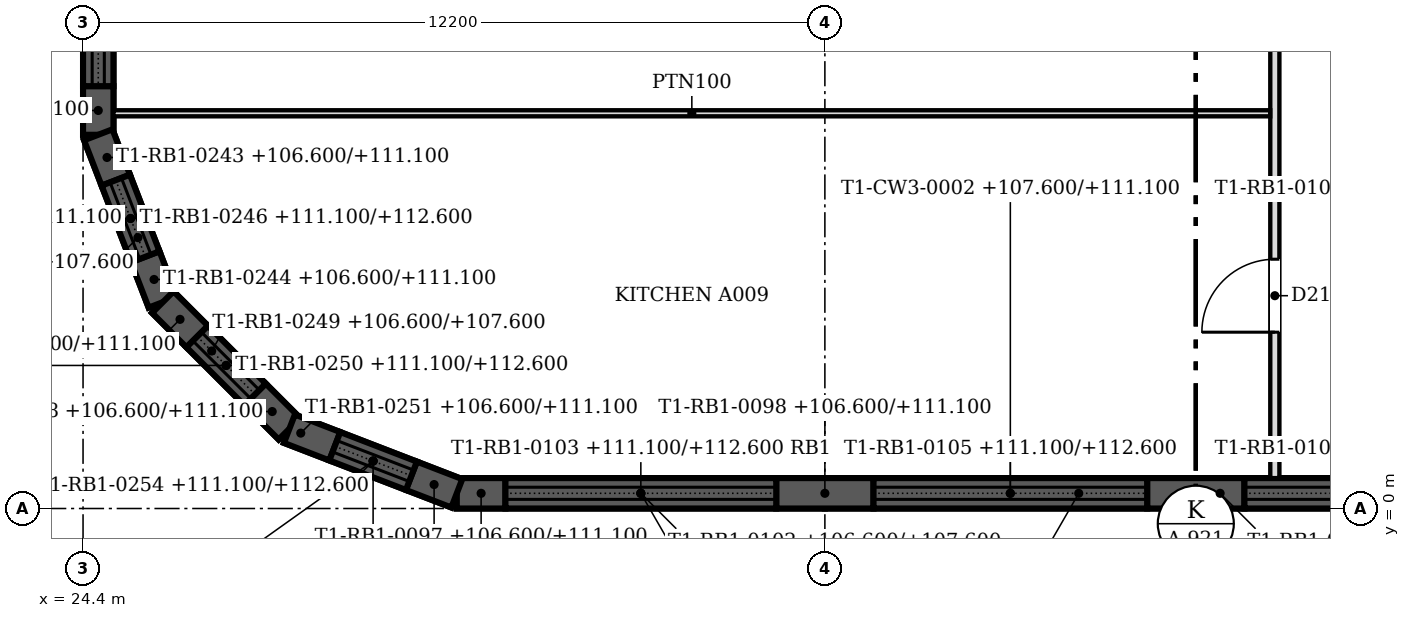
"""IFC4 building model, lengths in metres.
Left out: names, types, materials, properties, quantities, classifications, styles, units other than length and angle.
Written with IfcOpenShell. Run it as: python <this file> out.ifc"""

import sys

from ifc_helpers import new_model, si_unit, direction, frame, frame_2d, origin, place, context, subcontext, project, spatial, polyline, rectangle, outline, extrude, faceted_brep, source, transform, mapped, element, fill, save


model = new_model("IFC4")
c1 = context("Model", 3, precision=1e-05, world=origin(), true_north=direction((0.0, 1.0)))
c2 = subcontext(c1, "Body", "Model", "MODEL_VIEW")
j1 = project(units=[si_unit("LENGTHUNIT", "METRE"), si_unit("PLANEANGLEUNIT", "RADIAN")], contexts=[c1])
p1 = place(None, origin())
s1 = spatial("IfcSite", under=j1, at=p1, CompositionType="ELEMENT")
p2 = place(p1, origin())
s2 = spatial("IfcBuilding", under=s1, at=p2, CompositionType="ELEMENT")
p3 = place(p2, frame((0.0, 0.0, 106.6)))
s3 = spatial("IfcBuildingStorey", under=s2, at=p3, CompositionType="ELEMENT", Elevation=106.6)
m1 = source(origin(), c2, "Body", "Brep", [
    faceted_brep([(0.0, -0.25, 0.0), (0.8, -0.25, 0.0), (0.8, -0.25, 4.5), (0.0, -0.25, 4.5), (0.047, 0.25, 4.5), (0.8, 0.25, 4.5), (0.8, 0.25, 0.0), (0.047, 0.25, 0.0), (0.0, 0.0, 0.0), (0.0, 0.0, 4.5)], [[[0, 1, 2, 3]], [[4, 5, 6, 7]], [[7, 6, 1, 0, 8]], [[5, 4, 9, 3, 2]], [[8, 0, 3, 9]], [[7, 8, 9, 4]], [[1, 6, 5, 2]]]),
])
p4 = place(p3, frame((30.547, 0.25, 0.0), z_axis=(0.0, 0.0, 1.0), x_axis=(1.0, 0.0, 0.0)))
e1 = element("IfcWall", 1, at=p4, inside=s3, PredefinedType="SOLIDWALL", context=c2, shape_type="MappedRepresentation", body=[
    mapped(m1, transform((0.0, 0.0, 0.0), scale=1.0)),
])
m2 = source(origin(), c2, "Body", "Brep", [
    faceted_brep([(0.0, -0.25, 0.0), (1.6, -0.25, 0.0), (1.6, -0.25, 4.5), (0.0, -0.25, 4.5), (0.0, 0.25, 4.5), (1.6, 0.25, 4.5), (1.6, 0.25, 0.0), (0.0, 0.25, 0.0)], [[[0, 1, 2, 3]], [[4, 5, 6, 7]], [[7, 6, 1, 0]], [[5, 4, 3, 2]], [[4, 7, 0, 3]], [[1, 6, 5, 2]]]),
])
p5 = place(p3, frame((35.8, 0.25, 0.0), z_axis=(0.0, 0.0, 1.0), x_axis=(1.0, 0.0, 0.0)))
e2 = element("IfcWall", 2, at=p5, inside=s3, PredefinedType="SOLIDWALL", context=c2, shape_type="MappedRepresentation", body=[
    mapped(m2, transform((0.0, 0.0, 0.0), scale=1.0)),
])
m3 = source(origin(), c2, "Body", "SweptSolid", [
    extrude(outline(polyline([(0.0, 0.0), (1.6, 0.0), (1.6, 4.5), (0.0, 4.5), (0.0, 0.0)])), frame((0.0, 0.25, 0.0), z_axis=(0.0, -1.0, 0.0), x_axis=(1.0, 0.0, 0.0)), (0.0, 0.0, 1.0), 0.5),
])
p6 = place(p3, frame((41.9, 0.25, 0.0), z_axis=(0.0, 0.0, 1.0), x_axis=(1.0, 0.0, 0.0)))
e3 = element("IfcWall", 3, at=p6, inside=s3, PredefinedType="SOLIDWALL", context=c2, shape_type="MappedRepresentation", body=[
    mapped(m3, transform((0.0, 0.0, 0.0), scale=1.0)),
])
m4 = source(origin(), c2, "Body", "SweptSolid", [
    extrude(outline(polyline([(0.0, 0.0), (4.453, 0.0), (4.453, 1.0), (0.0, 1.0), (0.0, 0.0)])), frame((0.0, 0.25, 0.0), z_axis=(0.0, -1.0, 0.0), x_axis=(1.0, 0.0, 0.0)), (0.0, 0.0, 1.0), 0.5),
])
p7 = place(p3, frame((31.346, 0.25, 0.0), z_axis=(0.0, 0.0, 1.0), x_axis=(1.0, 0.0, 0.0)))
e4 = element("IfcWall", 4, at=p7, inside=s3, PredefinedType="SOLIDWALL", context=c2, shape_type="MappedRepresentation", body=[
    mapped(m4, transform((0.0, 0.0, 0.0), scale=1.0)),
])
m5 = source(origin(), c2, "Body", "Brep", [
    faceted_brep([(0.0, -0.25, 0.0), (6.053, -0.25, 0.0), (6.053, -0.25, 1.5), (0.0, -0.25, 1.5), (0.047, 0.25, 1.5), (6.053, 0.25, 1.5), (6.053, 0.25, 0.0), (0.047, 0.25, 0.0), (0.0, 0.0, 0.0), (0.0, 0.0, 1.5)], [[[0, 1, 2, 3]], [[4, 5, 6, 7]], [[7, 6, 1, 0, 8]], [[5, 4, 9, 3, 2]], [[8, 0, 3, 9]], [[7, 8, 9, 4]], [[1, 6, 5, 2]]]),
])
p8 = place(p3, frame((30.547, 0.25, 4.5), z_axis=(0.0, 0.0, 1.0), x_axis=(1.0, 0.0, 0.0)))
e5 = element("IfcWall", 5, at=p8, inside=s3, PredefinedType="SOLIDWALL", context=c2, shape_type="MappedRepresentation", body=[
    mapped(m5, transform((0.0, 0.0, 0.0), scale=1.0)),
])
m6 = source(origin(), c2, "Body", "SweptSolid", [
    extrude(outline(polyline([(0.0, 0.0), (4.5, 0.0), (4.5, 1.0), (0.0, 1.0), (0.0, 0.0)])), frame((0.0, 0.25, 0.0), z_axis=(0.0, -1.0, 0.0), x_axis=(1.0, 0.0, 0.0)), (0.0, 0.0, 1.0), 0.5),
])
p9 = place(p3, frame((37.4, 0.25, 0.0), z_axis=(0.0, 0.0, 1.0), x_axis=(1.0, 0.0, 0.0)))
e6 = element("IfcWall", 6, at=p9, inside=s3, PredefinedType="SOLIDWALL", context=c2, shape_type="MappedRepresentation", body=[
    mapped(m6, transform((0.0, 0.0, 0.0), scale=1.0)),
])
m7 = source(origin(), c2, "Body", "Brep", [
    faceted_brep([(0.0, -0.25, 0.0), (6.1, -0.25, 0.0), (6.1, -0.25, 1.5), (0.0, -0.25, 1.5), (0.0, 0.25, 1.5), (6.1, 0.25, 1.5), (6.1, 0.25, 0.0), (0.0, 0.25, 0.0)], [[[0, 1, 2, 3]], [[4, 5, 6, 7]], [[7, 6, 1, 0]], [[5, 4, 3, 2]], [[4, 7, 0, 3]], [[1, 6, 5, 2]]]),
])
p10 = place(p3, frame((36.6, 0.25, 4.5), z_axis=(0.0, 0.0, 1.0), x_axis=(1.0, 0.0, 0.0)))
e7 = element("IfcWall", 7, at=p10, inside=s3, PredefinedType="SOLIDWALL", context=c2, shape_type="MappedRepresentation", body=[
    mapped(m7, transform((0.0, 0.0, 0.0), scale=1.0)),
])
p11 = place(p3, frame((43.5, 0.25, 0.0), z_axis=(0.0, 0.0, 1.0), x_axis=(1.0, 0.0, 0.0)))
e8 = element("IfcWall", 8, at=p11, inside=s3, PredefinedType="SOLIDWALL", context=c2, shape_type="MappedRepresentation", body=[
    mapped(m6, transform((0.0, 0.0, 0.0), scale=1.0)),
])
m8 = source(origin(), c2, "Body", "SweptSolid", [
    extrude(outline(polyline([(0.0, 0.0), (6.1, 0.0), (6.1, 1.5), (0.0, 1.5), (0.0, 0.0)])), frame((0.0, 0.25, 0.0), z_axis=(0.0, -1.0, 0.0), x_axis=(1.0, 0.0, 0.0)), (0.0, 0.0, 1.0), 0.5),
])
p12 = place(p3, frame((42.7, 0.25, 4.5), z_axis=(0.0, 0.0, 1.0), x_axis=(1.0, 0.0, 0.0)))
e9 = element("IfcWall", 9, at=p12, inside=s3, PredefinedType="SOLIDWALL", context=c2, shape_type="MappedRepresentation", body=[
    mapped(m8, transform((0.0, 0.0, 0.0), scale=1.0)),
])
m9 = source(origin(), c2, "Body", "Brep", [
    faceted_brep([(0.0, -0.25, 0.0), (0.8, -0.25, 0.0), (0.8, -0.25, 4.5), (0.0, -0.25, 4.5), (0.0, 0.25, 4.5), (0.753, 0.25, 4.5), (0.753, 0.25, 0.0), (0.0, 0.25, 0.0), (0.8, -0.0, 0.0), (0.8, -0.0, 4.5)], [[[0, 1, 2, 3]], [[4, 5, 6, 7]], [[7, 6, 8, 1, 0]], [[9, 2, 1, 8]], [[5, 4, 3, 2, 9]], [[4, 7, 0, 3]], [[8, 6, 5, 9]]]),
])
p13 = place(p3, frame((24.65, 6.947, 0.0), z_axis=(0.0, 0.0, 1.0), x_axis=(0.0, -1.0, 0.0)))
e10 = element("IfcWall", 10, at=p13, inside=s3, PredefinedType="SOLIDWALL", context=c2, shape_type="MappedRepresentation", body=[
    mapped(m9, transform((0.0, 0.0, 0.0), scale=1.0)),
])
p14 = place(p3, frame((24.65, 11.447, 0.0), z_axis=(0.0, 0.0, 1.0), x_axis=(0.0, -1.0, 0.0)))
e11 = element("IfcWall", 11, at=p14, inside=s3, PredefinedType="SOLIDWALL", context=c2, shape_type="MappedRepresentation", body=[
    mapped(m6, transform((0.0, 0.0, 0.0), scale=1.0)),
])
m10 = source(origin(), c2, "Body", "Brep", [
    faceted_brep([(0.047, -0.25, 0.0), (6.1, -0.25, 0.0), (6.1, -0.25, 1.5), (0.047, -0.25, 1.5), (0.0, 0.25, 1.5), (6.053, 0.25, 1.5), (6.053, 0.25, 0.0), (0.0, 0.25, 0.0), (6.1, -0.0, 0.0), (0.0, 0.0, 0.0), (6.1, -0.0, 1.5), (0.0, 0.0, 1.5)], [[[0, 1, 2, 3]], [[4, 5, 6, 7]], [[7, 6, 8, 1, 0, 9]], [[10, 2, 1, 8]], [[5, 4, 11, 3, 2, 10]], [[4, 7, 9, 11]], [[9, 0, 3, 11]], [[8, 6, 5, 10]]]),
])
p15 = place(p3, frame((24.65, 12.247, 4.5), z_axis=(0.0, 0.0, 1.0), x_axis=(0.0, -1.0, 0.0)))
e12 = element("IfcWall", 12, at=p15, inside=s3, PredefinedType="SOLIDWALL", context=c2, shape_type="MappedRepresentation", body=[
    mapped(m10, transform((0.0, 0.0, 0.0), scale=1.0)),
])
p16 = place(p3, frame((24.65, 6.146, 0.0), z_axis=(0.0, 0.0, 1.0), x_axis=(0.360103552367, -0.932912338632, 0.0)))
e13 = element("IfcWall", 13, at=p16, inside=s3, PredefinedType="SOLIDWALL", context=c2, shape_type="MappedRepresentation", body=[
    mapped(m1, transform((0.0, 0.0, 0.0), scale=1.0)),
])
m11 = source(origin(), c2, "Body", "Brep", [
    faceted_brep([(0.0, -0.25, 0.0), (0.8, -0.25, 0.0), (0.8, -0.25, 4.5), (0.0, -0.25, 4.5), (0.0, 0.25, 4.5), (0.747, 0.25, 4.5), (0.747, 0.25, 0.0), (0.0, 0.25, 0.0), (0.8, -0.0, 0.0), (0.8, -0.0, 4.5)], [[[0, 1, 2, 3]], [[4, 5, 6, 7]], [[7, 6, 8, 1, 0]], [[9, 2, 1, 8]], [[5, 4, 3, 2, 9]], [[4, 7, 0, 3]], [[8, 6, 5, 9]]]),
])
p17 = place(p3, frame((25.424, 4.14, 0.0), z_axis=(0.0, 0.0, 1.0), x_axis=(0.3598379092, -0.93301483327, 0.0)))
e14 = element("IfcWall", 14, at=p17, inside=s3, PredefinedType="SOLIDWALL", context=c2, shape_type="MappedRepresentation", body=[
    mapped(m11, transform((0.0, 0.0, 0.0), scale=1.0)),
])
m12 = source(origin(), c2, "Body", "SweptSolid", [
    extrude(outline(polyline([(0.0, 0.0), (1.351, 0.0), (1.351, 1.0), (0.0, 1.0), (0.0, 0.0)])), frame((0.0, 0.25, 0.0), z_axis=(0.0, -1.0, 0.0), x_axis=(1.0, 0.0, 0.0)), (0.0, 0.0, 1.0), 0.5),
])
p18 = place(p3, frame((24.938, 5.4, 0.0), z_axis=(0.0, 0.0, 1.0), x_axis=(0.359923772835, -0.932981713512, 0.0)))
e15 = element("IfcWall", 15, at=p18, inside=s3, PredefinedType="SOLIDWALL", context=c2, shape_type="MappedRepresentation", body=[
    mapped(m12, transform((0.0, 0.0, 0.0), scale=1.0)),
])
m13 = source(origin(), c2, "Body", "Brep", [
    faceted_brep([(0.0, -0.25, 0.0), (2.95, -0.25, 0.0), (2.95, -0.25, 1.5), (0.0, -0.25, 1.5), (0.047, 0.25, 1.5), (2.898, 0.25, 1.5), (2.898, 0.25, 0.0), (0.047, 0.25, 0.0), (2.95, 0.0, 0.0), (0.0, 0.0, 0.0), (2.95, 0.0, 1.5), (0.0, 0.0, 1.5)], [[[0, 1, 2, 3]], [[4, 5, 6, 7]], [[7, 6, 8, 1, 0, 9]], [[10, 2, 1, 8]], [[5, 4, 11, 3, 2, 10]], [[9, 0, 3, 11]], [[7, 9, 11, 4]], [[8, 6, 5, 10]]]),
])
p19 = place(p3, frame((24.65, 6.146, 4.5), z_axis=(0.0, 0.0, 1.0), x_axis=(0.359949242603, -0.932971887438, 0.0)))
e16 = element("IfcWall", 16, at=p19, inside=s3, PredefinedType="SOLIDWALL", context=c2, shape_type="MappedRepresentation", body=[
    mapped(m13, transform((0.0, 0.0, 0.0), scale=1.0)),
])
m14 = source(origin(), c2, "Body", "Brep", [
    faceted_brep([(0.0, -0.25, 0.0), (0.8, -0.25, 0.0), (0.8, -0.25, 4.5), (0.0, -0.25, 4.5), (0.053, 0.25, 4.5), (0.8, 0.25, 4.5), (0.8, 0.25, 0.0), (0.053, 0.25, 0.0), (0.0, 0.0, 0.0), (0.0, 0.0, 4.5)], [[[0, 1, 2, 3]], [[4, 5, 6, 7]], [[7, 6, 1, 0, 8]], [[5, 4, 9, 3, 2]], [[8, 0, 3, 9]], [[7, 8, 9, 4]], [[1, 6, 5, 2]]]),
])
p20 = place(p3, frame((25.712, 3.394, 0.0), z_axis=(0.0, 0.0, 1.0), x_axis=(0.707106781187, -0.707106781187, 0.0)))
e17 = element("IfcWall", 17, at=p20, inside=s3, PredefinedType="SOLIDWALL", context=c2, shape_type="MappedRepresentation", body=[
    mapped(m14, transform((0.0, 0.0, 0.0), scale=1.0)),
])
m15 = source(origin(), c2, "Body", "Brep", [
    faceted_brep([(0.0, -0.25, 0.0), (0.8, -0.25, 0.0), (0.8, -0.25, 4.5), (0.0, -0.25, 4.5), (0.0, 0.25, 4.5), (0.747, 0.25, 4.5), (0.747, 0.25, 0.0), (0.0, 0.25, 0.0), (0.8, -0.0, 0.0), (0.8, -0.0, 4.5)], [[[0, 1, 2, 3]], [[4, 5, 6, 7]], [[7, 6, 8, 1, 0]], [[9, 2, 1, 8]], [[5, 4, 3, 2, 9]], [[4, 7, 0, 3]], [[8, 6, 5, 9]]]),
])
p21 = place(p3, frame((27.228, 1.878, 0.0), z_axis=(0.0, 0.0, 1.0), x_axis=(0.706954206636, -0.707259322823, 0.0)))
e18 = element("IfcWall", 18, at=p21, inside=s3, PredefinedType="SOLIDWALL", context=c2, shape_type="MappedRepresentation", body=[
    mapped(m15, transform((0.0, 0.0, 0.0), scale=1.0)),
])
m16 = source(origin(), c2, "Body", "SweptSolid", [
    extrude(outline(polyline([(0.0, 0.0), (1.344, 0.0), (1.344, 1.0), (0.0, 1.0), (0.0, 0.0)])), frame((0.0, 0.25, 0.0), z_axis=(0.0, -1.0, 0.0), x_axis=(1.0, 0.0, 0.0)), (0.0, 0.0, 1.0), 0.5),
])
p22 = place(p3, frame((26.278, 2.828, 0.0), z_axis=(0.0, 0.0, 1.0), x_axis=(0.707106781187, -0.707106781187, 0.0)))
e19 = element("IfcWall", 19, at=p22, inside=s3, PredefinedType="SOLIDWALL", context=c2, shape_type="MappedRepresentation", body=[
    mapped(m16, transform((0.0, 0.0, 0.0), scale=1.0)),
])
m17 = source(origin(), c2, "Body", "Brep", [
    faceted_brep([(0.0, -0.25, 0.0), (2.944, -0.25, 0.0), (2.944, -0.25, 1.5), (0.0, -0.25, 1.5), (0.053, 0.25, 1.5), (2.891, 0.25, 1.5), (2.891, 0.25, 0.0), (0.053, 0.25, 0.0), (2.944, 0.0, 0.0), (0.0, 0.0, 0.0), (2.944, 0.0, 1.5), (0.0, 0.0, 1.5)], [[[0, 1, 2, 3]], [[4, 5, 6, 7]], [[7, 6, 8, 1, 0, 9]], [[10, 2, 1, 8]], [[5, 4, 11, 3, 2, 10]], [[9, 0, 3, 11]], [[7, 9, 11, 4]], [[8, 6, 5, 10]]]),
])
p23 = place(p3, frame((25.712, 3.394, 4.5), z_axis=(0.0, 0.0, 1.0), x_axis=(0.707106781187, -0.707106781187, 0.0)))
e20 = element("IfcWall", 20, at=p23, inside=s3, PredefinedType="SOLIDWALL", context=c2, shape_type="MappedRepresentation", body=[
    mapped(m17, transform((0.0, 0.0, 0.0), scale=1.0)),
])
m18 = source(origin(), c2, "Body", "Brep", [
    faceted_brep([(0.0, -0.25, 0.0), (0.8, -0.25, 0.0), (0.8, -0.25, 4.5), (0.0, -0.25, 4.5), (0.053, 0.25, 4.5), (0.8, 0.25, 4.5), (0.8, 0.25, 0.0), (0.053, 0.25, 0.0), (0.0, 0.0, 0.0), (0.0, 0.0, 4.5)], [[[0, 1, 2, 3]], [[4, 5, 6, 7]], [[7, 6, 1, 0, 8]], [[5, 4, 9, 3, 2]], [[8, 0, 3, 9]], [[7, 8, 9, 4]], [[1, 6, 5, 2]]]),
])
p24 = place(p3, frame((27.794, 1.312, 0.0), z_axis=(0.0, 0.0, 1.0), x_axis=(0.932951894851, -0.360001058183, 0.0)))
e21 = element("IfcWall", 21, at=p24, inside=s3, PredefinedType="SOLIDWALL", context=c2, shape_type="MappedRepresentation", body=[
    mapped(m18, transform((0.0, 0.0, 0.0), scale=1.0)),
])
p25 = place(p3, frame((29.8, 0.538, 0.0), z_axis=(0.0, 0.0, 1.0), x_axis=(0.933054335486, -0.359735468129, 0.0)))
e22 = element("IfcWall", 22, at=p25, inside=s3, PredefinedType="SOLIDWALL", context=c2, shape_type="MappedRepresentation", body=[
    mapped(m9, transform((0.0, 0.0, 0.0), scale=1.0)),
])
p26 = place(p3, frame((28.54, 1.024, 0.0), z_axis=(0.0, 0.0, 1.0), x_axis=(0.932981713512, -0.359923772835, 0.0)))
e23 = element("IfcWall", 23, at=p26, inside=s3, PredefinedType="SOLIDWALL", context=c2, shape_type="MappedRepresentation", body=[
    mapped(m12, transform((0.0, 0.0, 0.0), scale=1.0)),
])
m19 = source(origin(), c2, "Body", "Brep", [
    faceted_brep([(0.0, -0.25, 0.0), (2.95, -0.25, 0.0), (2.95, -0.25, 1.5), (0.0, -0.25, 1.5), (0.053, 0.25, 1.5), (2.904, 0.25, 1.5), (2.904, 0.25, 0.0), (0.053, 0.25, 0.0), (2.95, 0.0, 0.0), (0.0, 0.0, 0.0), (2.95, 0.0, 1.5), (0.0, 0.0, 1.5)], [[[0, 1, 2, 3]], [[4, 5, 6, 7]], [[7, 6, 8, 1, 0, 9]], [[10, 2, 1, 8]], [[5, 4, 11, 3, 2, 10]], [[9, 0, 3, 11]], [[7, 9, 11, 4]], [[8, 6, 5, 10]]]),
])
p27 = place(p3, frame((27.794, 1.312, 4.5), z_axis=(0.0, 0.0, 1.0), x_axis=(0.932971887438, -0.359949242603, 0.0)))
e24 = element("IfcWall", 24, at=p27, inside=s3, PredefinedType="SOLIDWALL", context=c2, shape_type="MappedRepresentation", body=[
    mapped(m19, transform((0.0, 0.0, 0.0), scale=1.0)),
])
p28 = place(p3, frame((44.0, 0.5, 0.0), z_axis=(0.0, 0.0, 1.0), x_axis=(0.0, 1.0, 0.0)))
e25 = element("IfcWall", 25, at=p28, inside=s3, PredefinedType="PARTITIONING", context=c2, shape_type="SweptSolid", body=[
    extrude(rectangle(XDim=15.624, YDim=0.15, at=frame_2d((7.812, 0.0))), origin(), (0.0, 0.0, 1.0), 5.167),
])
m20 = source(origin(), c2, "Body", "SweptSolid", [
    extrude(rectangle(XDim=1.2, YDim=2.1, at=frame_2d((0.6, 1.05))), frame((0.0, 0.085, 0.0), z_axis=(0.0, -1.0, 0.0), x_axis=(1.0, 0.0, 0.0)), (0.0, 0.0, 1.0), 0.17),
])
p29 = place(p28, frame((2.4, 0.0, 0.0)))
e26 = element("IfcOpeningElement", 26, at=p29, cuts=e25, PredefinedType="OPENING", context=c2, shape_type="MappedRepresentation", body=[
    mapped(m20, transform((0.0, 0.0, 0.0), scale=1.0)),
])
p30 = place(p3, frame((24.9, 6.5, 0.0), z_axis=(0.0, 0.0, 1.0), x_axis=(1.0, 0.0, 0.0)))
e27 = element("IfcWall", 27, at=p30, inside=s3, PredefinedType="PARTITIONING", context=c2, shape_type="SweptSolid", body=[
    extrude(rectangle(XDim=19.024, YDim=0.1, at=frame_2d((9.512, 0.0))), origin(), (0.0, 0.0, 1.0), 5.167),
])
m21 = source(origin(), c2, "Body", "SweptSolid", [
    extrude(rectangle(XDim=1.2, YDim=2.1, at=frame_2d((0.6, 1.05))), frame((0.0, 0.025, 0.0), z_axis=(0.0, -1.0, 0.0), x_axis=(1.0, 0.0, 0.0)), (0.0, 0.0, 1.0), 0.05),
])
p31 = place(p29, origin())
e28 = element("IfcDoor", 28, at=p31, inside=s3, OperationType="SINGLE_SWING_LEFT", PredefinedType="DOOR", context=c2, shape_type="MappedRepresentation", body=[
    mapped(m21, transform((0.0, 0.0, 0.0), scale=1.0)),
])
fill(e26, e28)
save(model, sys.argv[1])
